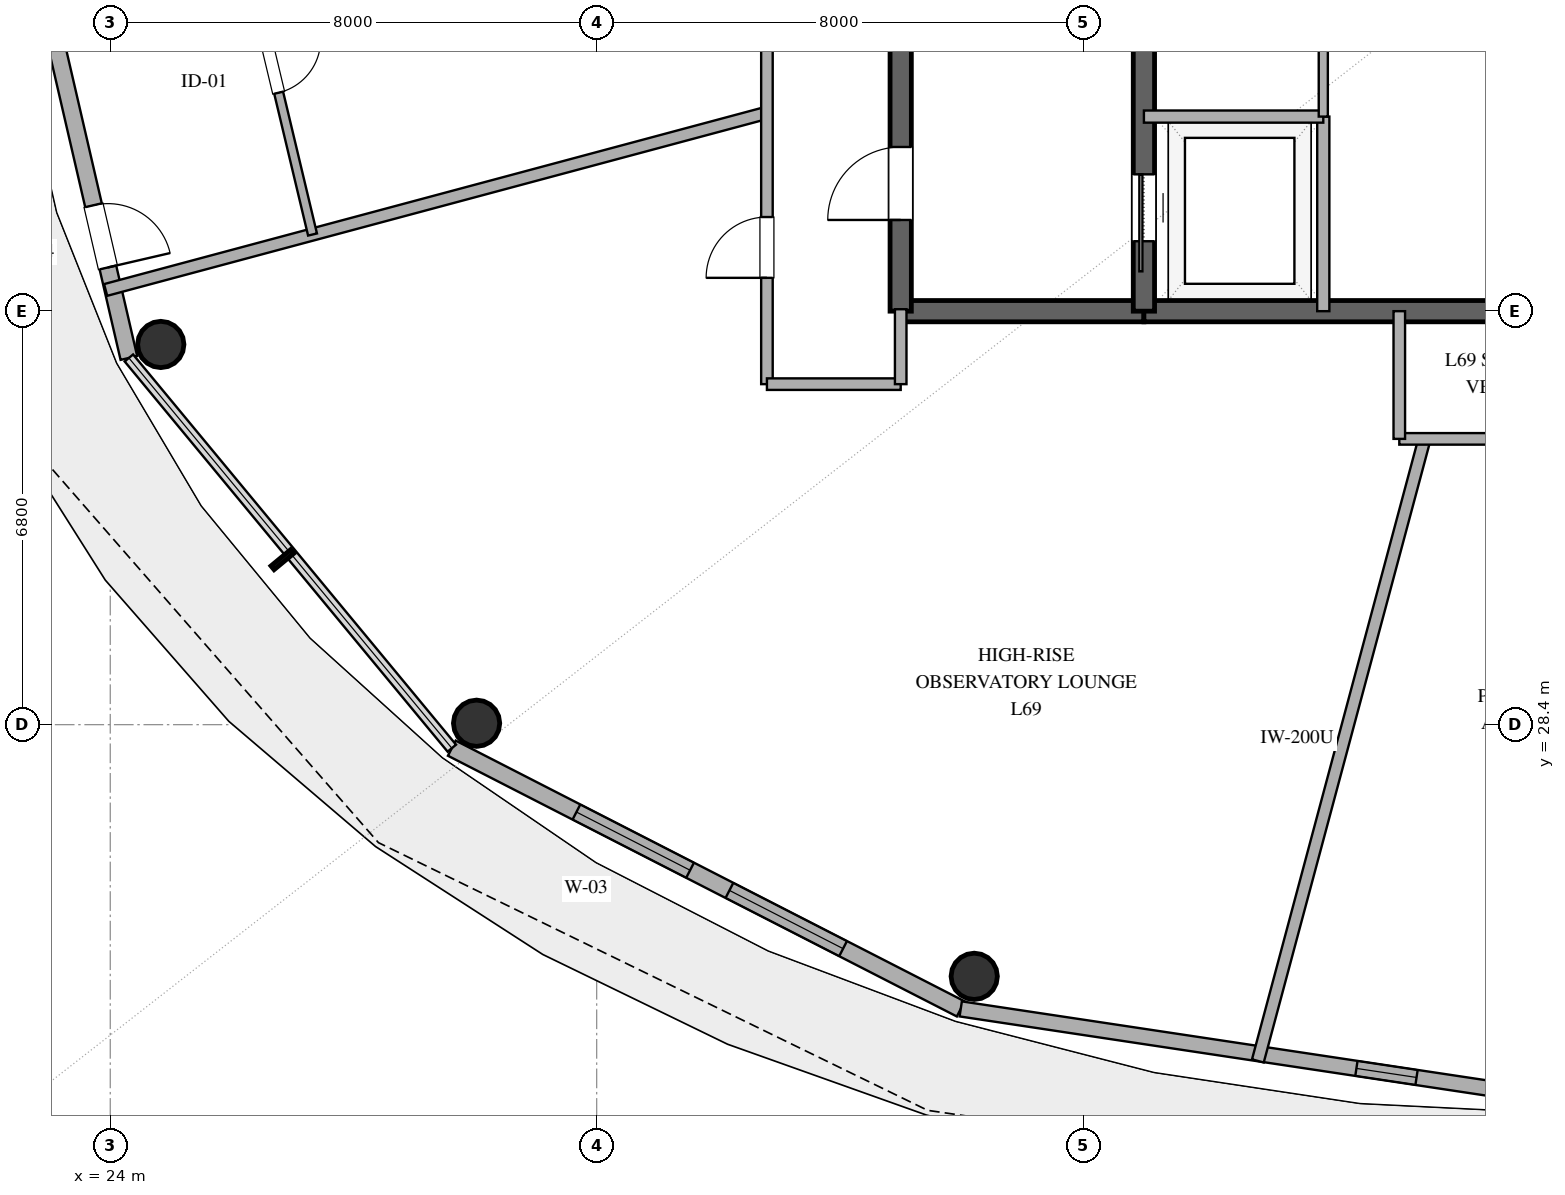
"""IFC4 building model, lengths in metres.
Left out: names, types, materials, properties, quantities, classifications, styles, units other than length and angle.
Written with IfcOpenShell. Run it as: python <this file> out.ifc"""

import sys

from ifc_helpers import new_model, si_unit, direction, frame, frame_2d, origin, origin_2d, place, context, subcontext, project, spatial, rectangle, hollow_circle, extrude, element, fill, save


model = new_model("IFC4")
c1 = context("Model", 3, precision=1e-05, world=origin(), true_north=direction((0.0, 1.0)))
c2 = subcontext(c1, "Body", "Model", "MODEL_VIEW")
j1 = project(units=[si_unit("LENGTHUNIT", "METRE"), si_unit("PLANEANGLEUNIT", "RADIAN")], contexts=[c1])
p1 = place(None, origin())
s1 = spatial("IfcSite", under=j1, at=p1, CompositionType="ELEMENT")
p2 = place(p1, origin())
s2 = spatial("IfcBuilding", under=s1, at=p2, CompositionType="ELEMENT")
p3 = place(p2, frame((0.0, 0.0, 269.4)))
s3 = spatial("IfcBuildingStorey", under=s2, at=p3, CompositionType="ELEMENT", Elevation=269.4)
p4 = place(p3, frame((37.0, 35.2, 0.0), z_axis=(0.0, 0.0, 1.0), x_axis=(1.0, 0.0, 0.0)))
e1 = element("IfcWall", 1, at=p4, inside=s3, PredefinedType="SHEAR", context=c2, shape_type="SweptSolid", body=[
    extrude(rectangle(XDim=4.0, YDim=0.35, at=frame_2d((2.0, 0.0))), origin(), (0.0, 0.0, 1.0), 3.37),
])
p5 = place(p3, frame((41.0, 35.2, 0.0), z_axis=(0.0, 0.0, 1.0), x_axis=(1.0, 0.0, 0.0)))
e2 = element("IfcWall", 2, at=p5, inside=s3, PredefinedType="SHEAR", context=c2, shape_type="SweptSolid", body=[
    extrude(rectangle(XDim=14.0, YDim=0.35, at=frame_2d((7.0, 0.0))), origin(), (0.0, 0.0, 1.0), 3.37),
])
p6 = place(p5, frame((6.1, 0.0, 0.0)))
e3 = element("IfcOpeningElement", 3, at=p6, cuts=e2, PredefinedType="OPENING", context=c2, shape_type="SweptSolid", body=[
    extrude(rectangle(XDim=1.8, YDim=2.25, at=frame_2d((0.9, 1.125))), frame((0.0, 0.185, 0.0), z_axis=(0.0, -1.0, 0.0), x_axis=(1.0, 0.0, 0.0)), (0.0, 0.0, 1.0), 0.37),
])
p7 = place(p3, frame((37.0, 35.2, 0.0), z_axis=(0.0, 0.0, 1.0), x_axis=(0.0, 1.0, 0.0)))
e4 = element("IfcWall", 4, at=p7, inside=s3, PredefinedType="SHEAR", context=c2, shape_type="SweptSolid", body=[
    extrude(rectangle(XDim=13.6, YDim=0.35, at=frame_2d((6.8, 0.0))), origin(), (0.0, 0.0, 1.0), 3.37),
])
p8 = place(p7, frame((1.5, 0.0, 0.0)))
e5 = element("IfcOpeningElement", 5, at=p8, cuts=e4, PredefinedType="OPENING", context=c2, shape_type="SweptSolid", body=[
    extrude(rectangle(XDim=1.2, YDim=2.15, at=frame_2d((0.6, 1.075))), frame((0.0, 0.185, 0.0), z_axis=(0.0, -1.0, 0.0), x_axis=(1.0, 0.0, 0.0)), (0.0, 0.0, 1.0), 0.37),
])
p9 = place(p3, frame((41.0, 35.2, 0.0), z_axis=(0.0, 0.0, 1.0), x_axis=(0.0, 1.0, 0.0)))
e6 = element("IfcWall", 6, at=p9, inside=s3, PredefinedType="SHEAR", context=c2, shape_type="SweptSolid", body=[
    extrude(rectangle(XDim=13.6, YDim=0.35, at=frame_2d((6.8, 0.0))), origin(), (0.0, 0.0, 1.0), 3.37),
])
p10 = place(p9, frame((1.15, 0.0, 0.0)))
e7 = element("IfcOpeningElement", 7, at=p10, cuts=e6, PredefinedType="OPENING", context=c2, shape_type="SweptSolid", body=[
    extrude(rectangle(XDim=1.1, YDim=2.2, at=frame_2d((0.55, 1.1))), frame((0.0, 0.185, 0.0), z_axis=(0.0, -1.0, 0.0), x_axis=(1.0, 0.0, 0.0)), (0.0, 0.0, 1.0), 0.37),
])
for number, where, z_axis, x_axis in (
    (8, (24.831, 34.653, 0.0), (0.0, 0.0, 1.0), (1.0, 0.0, 0.0)),
    (9, (30.025, 28.424, 0.0), (0.0, 0.0, 1.0), (1.0, 0.0, 0.0)),
    (10, (38.209, 24.261, 0.0), (0.0, 0.0, 1.0), (1.0, 0.0, 0.0)),
):
    element("IfcColumn", number, at=place(p3, frame(where, z_axis=z_axis, x_axis=x_axis)), inside=s3, PredefinedType="COLUMN", context=c2, shape_type="SweptSolid", body=[
        extrude(hollow_circle(Radius=0.381, WallThickness=0.025, at=origin_2d()), origin(), (0.0, 0.0, 1.0), 3.37),
    ])
p11 = place(p3, frame((22.553, 42.0, 0.0), z_axis=(0.0, 0.0, 1.0), x_axis=(0.225635078214, -0.974211892495, 0.0)))
e11 = element("IfcWall", 11, at=p11, inside=s3, PredefinedType="SOLIDWALL", context=c2, shape_type="SweptSolid", body=[
    extrude(rectangle(XDim=7.77, YDim=0.28, at=frame_2d((3.885, 0.0))), origin(), (0.0, 0.0, 1.0), 3.37),
])
p12 = place(p11, frame((5.192, 0.0, 0.0)))
e12 = element("IfcOpeningElement", 12, at=p12, cuts=e11, PredefinedType="OPENING", context=c2, shape_type="SweptSolid", body=[
    extrude(rectangle(XDim=1.05, YDim=2.2, at=frame_2d((0.525, 1.1))), frame((0.0, 0.15, 0.0), z_axis=(0.0, -1.0, 0.0), x_axis=(1.0, 0.0, 0.0)), (0.0, 0.0, 1.0), 0.3),
])
p13 = place(p3, frame((29.617, 28.013, 0.0), z_axis=(0.0, 0.0, 1.0), x_axis=(0.890007394051, -0.455946091699, 0.0)))
e13 = element("IfcWall", 13, at=p13, inside=s3, PredefinedType="SOLIDWALL", context=c2, shape_type="SweptSolid", body=[
    extrude(rectangle(XDim=9.404, YDim=0.28, at=frame_2d((4.702, 0.0))), origin(), (0.0, 0.0, 1.0), 3.37),
])
p14 = place(p13, frame((2.303, 0.0, 0.85)))
e14 = element("IfcOpeningElement", 14, at=p14, cuts=e13, PredefinedType="OPENING", context=c2, shape_type="SweptSolid", body=[
    extrude(rectangle(XDim=2.1, YDim=2.2, at=frame_2d((1.05, 1.1))), frame((0.0, 0.15, 0.0), z_axis=(0.0, -1.0, 0.0), x_axis=(1.0, 0.0, 0.0)), (0.0, 0.0, 1.0), 0.3),
])
p15 = place(p13, frame((5.13, 0.0, 0.85)))
e15 = element("IfcOpeningElement", 15, at=p15, cuts=e13, PredefinedType="OPENING", context=c2, shape_type="SweptSolid", body=[
    extrude(rectangle(XDim=2.1, YDim=2.2, at=frame_2d((1.05, 1.1))), frame((0.0, 0.15, 0.0), z_axis=(0.0, -1.0, 0.0), x_axis=(1.0, 0.0, 0.0)), (0.0, 0.0, 1.0), 0.3),
])
p16 = place(p3, frame((37.987, 23.726, 0.0), z_axis=(0.0, 0.0, 1.0), x_axis=(0.988882522213, -0.148698881169, 0.0)))
e16 = element("IfcWall", 16, at=p16, inside=s3, PredefinedType="SOLIDWALL", context=c2, shape_type="SweptSolid", body=[
    extrude(rectangle(XDim=10.125, YDim=0.25, at=frame_2d((5.062, 0.0))), origin(), (0.0, 0.0, 1.0), 3.37),
])
p17 = place(p16, frame((6.581, 0.0, 1.42)))
e17 = element("IfcOpeningElement", 17, at=p17, cuts=e16, PredefinedType="OPENING", context=c2, shape_type="SweptSolid", body=[
    extrude(rectangle(XDim=1.0, YDim=1.05, at=frame_2d((0.5, 0.525))), frame((0.0, 0.135, 0.0), z_axis=(0.0, -1.0, 0.0), x_axis=(1.0, 0.0, 0.0)), (0.0, 0.0, 1.0), 0.27),
])
p18 = place(p3, frame((43.95, 35.2, 0.0), z_axis=(0.0, 0.0, 1.0), x_axis=(0.0, 1.0, 0.0)))
e18 = element("IfcWall", 18, at=p18, inside=s3, PredefinedType="SOLIDWALL", context=c2, shape_type="SweptSolid", body=[
    extrude(rectangle(XDim=3.2, YDim=0.2, at=frame_2d((1.6, 0.0))), origin(), (0.0, 0.0, 1.0), 2.73),
])
p19 = place(p3, frame((41.0, 38.4, 0.0), z_axis=(0.0, 0.0, 1.0), x_axis=(1.0, 0.0, 0.0)))
e19 = element("IfcWall", 19, at=p19, inside=s3, PredefinedType="SOLIDWALL", context=c2, shape_type="SweptSolid", body=[
    extrude(rectangle(XDim=2.95, YDim=0.2, at=frame_2d((1.475, 0.0))), origin(), (0.0, 0.0, 1.0), 2.73),
])
p20 = place(p3, frame((43.95, 38.4, 0.0), z_axis=(0.0, 0.0, 1.0), x_axis=(0.0, 1.0, 0.0)))
e20 = element("IfcWall", 20, at=p20, inside=s3, PredefinedType="PARTITIONING", context=c2, shape_type="SweptSolid", body=[
    extrude(rectangle(XDim=4.0, YDim=0.15, at=frame_2d((2.0, 0.0))), origin(), (0.0, 0.0, 1.0), 2.73),
])
p21 = place(p20, frame((1.5, 0.0, 0.0)))
e21 = element("IfcOpeningElement", 21, at=p21, cuts=e20, PredefinedType="OPENING", context=c2, shape_type="SweptSolid", body=[
    extrude(rectangle(XDim=0.9, YDim=2.15, at=frame_2d((0.45, 1.075))), frame((0.0, 0.085, 0.0), z_axis=(0.0, -1.0, 0.0), x_axis=(1.0, 0.0, 0.0)), (0.0, 0.0, 1.0), 0.17),
])
p22 = place(p3, frame((42.874, 22.87, 0.0), z_axis=(0.0, 0.0, 1.0), x_axis=(0.258827496332, 0.965923561749, 0.0)))
e22 = element("IfcWall", 22, at=p22, inside=s3, PredefinedType="PARTITIONING", context=c2, shape_type="SweptSolid", body=[
    extrude(rectangle(XDim=10.591, YDim=0.2, at=frame_2d((5.295, 0.0))), origin(), (0.0, 0.0, 1.0), 2.73),
])
p23 = place(p3, frame((23.924, 35.549, 0.0), z_axis=(0.0, 0.0, 1.0), x_axis=(0.965923661364, 0.258827124578, 0.0)))
e23 = element("IfcWall", 23, at=p23, inside=s3, PredefinedType="PARTITIONING", context=c2, shape_type="SweptSolid", body=[
    extrude(rectangle(XDim=11.26, YDim=0.2, at=frame_2d((5.63, 0.0))), origin(), (0.0, 0.0, 1.0), 2.73),
])
p24 = place(p3, frame((34.8, 34.0, 0.0), z_axis=(0.0, 0.0, 1.0), x_axis=(0.0, 1.0, 0.0)))
e24 = element("IfcWall", 24, at=p24, inside=s3, PredefinedType="PARTITIONING", context=c2, shape_type="SweptSolid", body=[
    extrude(rectangle(XDim=12.196, YDim=0.19, at=frame_2d((6.098, 0.0))), origin(), (0.0, 0.0, 1.0), 2.73),
])
p25 = place(p24, frame((1.748, 0.0, 0.0)))
e25 = element("IfcOpeningElement", 25, at=p25, cuts=e24, PredefinedType="OPENING", context=c2, shape_type="SweptSolid", body=[
    extrude(rectangle(XDim=1.0, YDim=2.2, at=frame_2d((0.5, 1.1))), frame((0.0, 0.105, 0.0), z_axis=(0.0, -1.0, 0.0), x_axis=(1.0, 0.0, 0.0)), (0.0, 0.0, 1.0), 0.21),
])
p26 = place(p3, frame((26.004, 42.0, 0.0), z_axis=(0.0, 0.0, 1.0), x_axis=(0.232304342064, -0.972643147644, 0.0)))
e26 = element("IfcWall", 26, at=p26, inside=s3, PredefinedType="PARTITIONING", context=c2, shape_type="SweptSolid", body=[
    extrude(rectangle(XDim=5.695, YDim=0.15, at=frame_2d((2.848, 0.0))), origin(), (0.0, 0.0, 1.0), 2.73),
])
p27 = place(p26, frame((2.398, 0.0, 0.0)))
e27 = element("IfcOpeningElement", 27, at=p27, cuts=e26, PredefinedType="OPENING", context=c2, shape_type="SweptSolid", body=[
    extrude(rectangle(XDim=0.9, YDim=2.1, at=frame_2d((0.45, 1.05))), frame((0.0, 0.085, 0.0), z_axis=(0.0, -1.0, 0.0), x_axis=(1.0, 0.0, 0.0)), (0.0, 0.0, 1.0), 0.17),
])
p28 = place(p3, frame((50.8, 33.1, 0.0), z_axis=(0.0, 0.0, 1.0), x_axis=(-1.0, 0.0, 0.0)))
e28 = element("IfcWall", 28, at=p28, inside=s3, PredefinedType="PARTITIONING", context=c2, shape_type="SweptSolid", body=[
    extrude(rectangle(XDim=5.6, YDim=0.19, at=frame_2d((2.8, 0.0))), origin(), (0.0, 0.0, 1.0), 2.73),
])
p29 = place(p28, frame((2.3, 0.0, 0.0)))
e29 = element("IfcOpeningElement", 29, at=p29, cuts=e28, PredefinedType="OPENING", context=c2, shape_type="SweptSolid", body=[
    extrude(rectangle(XDim=1.0, YDim=2.2, at=frame_2d((0.5, 1.1))), frame((0.0, 0.105, 0.0), z_axis=(0.0, -1.0, 0.0), x_axis=(1.0, 0.0, 0.0)), (0.0, 0.0, 1.0), 0.21),
])
p30 = place(p3, frame((37.0, 34.0, 0.0), z_axis=(0.0, 0.0, 1.0), x_axis=(-1.0, 0.0, 0.0)))
e30 = element("IfcWall", 30, at=p30, inside=s3, PredefinedType="PARTITIONING", context=c2, shape_type="SweptSolid", body=[
    extrude(rectangle(XDim=2.2, YDim=0.19, at=frame_2d((1.1, 0.0))), origin(), (0.0, 0.0, 1.0), 2.73),
])
p31 = place(p3, frame((45.2, 35.2, 0.0), z_axis=(0.0, 0.0, 1.0), x_axis=(0.0, -1.0, 0.0)))
e31 = element("IfcWall", 31, at=p31, inside=s3, PredefinedType="PARTITIONING", context=c2, shape_type="SweptSolid", body=[
    extrude(rectangle(XDim=2.1, YDim=0.19, at=frame_2d((1.05, 0.0))), origin(), (0.0, 0.0, 1.0), 2.73),
])
p32 = place(p3, frame((37.0, 35.232, 0.0), z_axis=(0.0, 0.0, 1.0), x_axis=(0.0, -1.0, 0.0)))
e32 = element("IfcWall", 32, at=p32, inside=s3, PredefinedType="PARTITIONING", context=c2, shape_type="SweptSolid", body=[
    extrude(rectangle(XDim=1.232, YDim=0.19, at=frame_2d((0.616, 0.0))), origin(), (0.0, 0.0, 1.0), 2.73),
])
p33 = place(p12, origin())
e33 = element("IfcDoor", 33, at=p33, inside=s3, OperationType="SINGLE_SWING_RIGHT", PredefinedType="DOOR", context=c2, shape_type="SweptSolid", body=[
    extrude(rectangle(XDim=1.05, YDim=2.2, at=frame_2d((0.525, 1.1))), frame((0.0, 0.025, 0.0), z_axis=(0.0, -1.0, 0.0), x_axis=(1.0, 0.0, 0.0)), (0.0, 0.0, 1.0), 0.05),
])
fill(e12, e33)
p34 = place(p14, origin())
e34 = element("IfcWindow", 34, at=p34, inside=s3, PartitioningType="SINGLE_PANEL", PredefinedType="WINDOW", context=c2, shape_type="SweptSolid", body=[
    extrude(rectangle(XDim=2.1, YDim=2.2, at=frame_2d((1.05, 1.1))), frame((0.0, 0.03, 0.0), z_axis=(0.0, -1.0, 0.0), x_axis=(1.0, 0.0, 0.0)), (0.0, 0.0, 1.0), 0.06),
])
fill(e14, e34)
p35 = place(p15, origin())
e35 = element("IfcWindow", 35, at=p35, inside=s3, PartitioningType="SINGLE_PANEL", PredefinedType="WINDOW", context=c2, shape_type="SweptSolid", body=[
    extrude(rectangle(XDim=2.1, YDim=2.2, at=frame_2d((1.05, 1.1))), frame((0.0, 0.03, 0.0), z_axis=(0.0, -1.0, 0.0), x_axis=(1.0, 0.0, 0.0)), (0.0, 0.0, 1.0), 0.06),
])
fill(e15, e35)
p36 = place(p17, origin())
e36 = element("IfcWindow", 36, at=p36, inside=s3, PartitioningType="SINGLE_PANEL", PredefinedType="WINDOW", context=c2, shape_type="SweptSolid", body=[
    extrude(rectangle(XDim=1.0, YDim=1.05, at=frame_2d((0.5, 0.525))), frame((0.0, 0.03, 0.0), z_axis=(0.0, -1.0, 0.0), x_axis=(1.0, 0.0, 0.0)), (0.0, 0.0, 1.0), 0.06),
])
fill(e17, e36)
p37 = place(p10, origin())
e37 = element("IfcDoor", 37, at=p37, inside=s3, OperationType="SLIDING_TO_LEFT", PredefinedType="DOOR", context=c2, shape_type="SweptSolid", body=[
    extrude(rectangle(XDim=1.1, YDim=2.2, at=frame_2d((0.55, 1.1))), frame((0.0, 0.025, 0.0), z_axis=(0.0, -1.0, 0.0), x_axis=(1.0, 0.0, 0.0)), (0.0, 0.0, 1.0), 0.05),
])
fill(e7, e37)
p38 = place(p8, origin())
e38 = element("IfcDoor", 38, at=p38, inside=s3, OperationType="SINGLE_SWING_LEFT", PredefinedType="DOOR", context=c2, shape_type="SweptSolid", body=[
    extrude(rectangle(XDim=1.2, YDim=2.15, at=frame_2d((0.6, 1.075))), frame((0.0, 0.025, 0.0), z_axis=(0.0, -1.0, 0.0), x_axis=(1.0, 0.0, 0.0)), (0.0, 0.0, 1.0), 0.05),
])
fill(e5, e38)
p39 = place(p25, origin())
e39 = element("IfcDoor", 39, at=p39, inside=s3, OperationType="SINGLE_SWING_LEFT", PredefinedType="DOOR", context=c2, shape_type="SweptSolid", body=[
    extrude(rectangle(XDim=1.0, YDim=2.2, at=frame_2d((0.5, 1.1))), frame((0.0, 0.025, 0.0), z_axis=(0.0, -1.0, 0.0), x_axis=(1.0, 0.0, 0.0)), (0.0, 0.0, 1.0), 0.05),
])
fill(e25, e39)
p40 = place(p27, origin())
e40 = element("IfcDoor", 40, at=p40, inside=s3, OperationType="SINGLE_SWING_LEFT", PredefinedType="DOOR", context=c2, shape_type="SweptSolid", body=[
    extrude(rectangle(XDim=0.9, YDim=2.1, at=frame_2d((0.45, 1.05))), frame((0.0, 0.025, 0.0), z_axis=(0.0, -1.0, 0.0), x_axis=(1.0, 0.0, 0.0)), (0.0, 0.0, 1.0), 0.05),
])
fill(e27, e40)
save(model, sys.argv[1])
